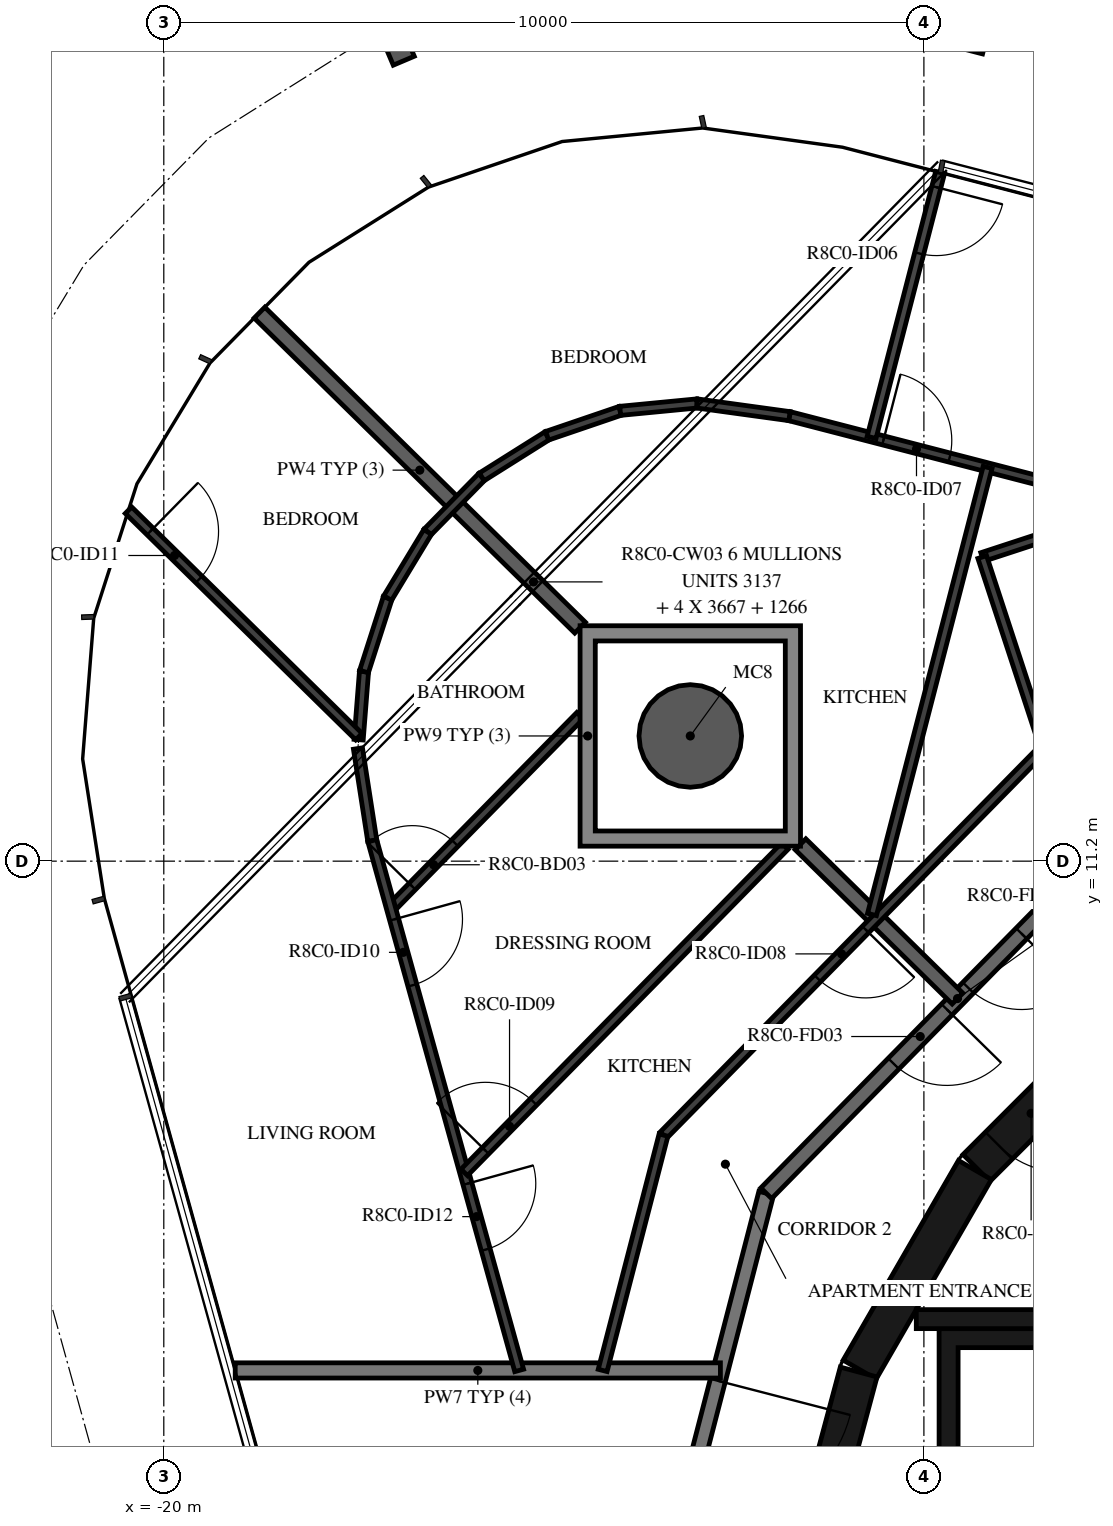
"""IFC4 building model, lengths in metres.
Left out: names, types, materials, properties, quantities, classifications, styles, units other than length and angle.
Written with IfcOpenShell. Run it as: python <this file> out.ifc"""

import sys

from ifc_helpers import new_model, si_unit, direction, frame, frame_2d, origin, origin_2d, place, context, subcontext, project, spatial, polyline, rectangle, hollow_circle, i_section, outline, extrude, element, fill, save


model = new_model("IFC4")
c1 = context("Model", 3, precision=1e-05, world=origin(), true_north=direction((0.0, 1.0)))
c2 = subcontext(c1, "Body", "Model", "MODEL_VIEW")
j1 = project(units=[si_unit("LENGTHUNIT", "METRE"), si_unit("PLANEANGLEUNIT", "RADIAN")], contexts=[c1])
p1 = place(None, origin())
s1 = spatial("IfcSite", under=j1, at=p1, CompositionType="ELEMENT")
p2 = place(p1, origin())
s2 = spatial("IfcBuilding", under=s1, at=p2, CompositionType="ELEMENT")
p3 = place(p2, frame((0.0, 0.0, 319.2)))
s3 = spatial("IfcBuildingStorey", under=s2, at=p3, CompositionType="ELEMENT", Elevation=319.2)
p4 = place(p3, frame((-13.073, 12.847, -0.38), z_axis=(0.0, 0.0, 1.0), x_axis=(1.0, 0.0, 0.0)))
e1 = element("IfcColumn", 1, at=p4, inside=s3, PredefinedType="COLUMN", context=c2, shape_type="SweptSolid", body=[
    extrude(hollow_circle(Radius=0.675, WallThickness=0.03, at=origin_2d()), origin(), (0.0, 0.0, 1.0), 3.5),
])
for number, where, z_axis, x_axis in (
    (2, (-9.261, 22.293, -0.38), (0.0, 0.0, 1.0), (0.968, -0.25, 0.0)),
    (3, (-17.019, 22.145, -0.38), (0.0, 0.0, 1.0), (0.921, 0.391, 0.0)),
):
    element("IfcColumn", number, at=place(p3, frame(where, z_axis=z_axis, x_axis=x_axis)), inside=s3, PredefinedType="COLUMN", context=c2, shape_type="SweptSolid", body=[
        extrude(i_section(OverallWidth=0.3, OverallDepth=0.9, WebThickness=0.019, FlangeThickness=0.035, FilletRadius=0.03, at=origin_2d()), origin(), (0.0, 0.0, 1.0), 3.5),
    ])
p5 = place(p3, frame((-7.164, 9.308, 0.0), z_axis=(0.0, 0.0, 1.0), x_axis=(-0.707106781187, -0.707106781187, 0.0)))
e4 = element("IfcWall", 4, at=p5, inside=s3, PredefinedType="SHEAR", context=c2, shape_type="SweptSolid", body=[
    extrude(rectangle(XDim=3.032, YDim=0.5, at=frame_2d((1.516, 0.0))), origin(), (0.0, 0.0, 1.0), 3.12),
])
p6 = place(p5, frame((1.416, 0.0, 0.0)))
e5 = element("IfcOpeningElement", 5, at=p6, cuts=e4, PredefinedType="OPENING", context=c2, shape_type="SweptSolid", body=[
    extrude(rectangle(XDim=1.2, YDim=2.1, at=frame_2d((0.6, 1.05))), frame((0.0, 0.26, 0.0), z_axis=(0.0, -1.0, 0.0), x_axis=(1.0, 0.0, 0.0)), (0.0, 0.0, 1.0), 0.52),
])
for number, where, z_axis, x_axis in (
    (6, (-9.329, 7.137, 0.0), (0.0, 0.0, 1.0), (-0.5, -0.866, 0.0)),
    (7, (-10.858, 4.479, 0.0), (0.0, 0.0, 1.0), (-0.259, -0.966, 0.0)),
):
    element("IfcWall", number, at=place(p3, frame(where, z_axis=z_axis, x_axis=x_axis)), inside=s3, PredefinedType="SHEAR", context=c2, shape_type="SweptSolid", body=[
        extrude(rectangle(XDim=3.033, YDim=0.5, at=frame_2d((1.516, 0.0))), origin(), (0.0, 0.0, 1.0), 3.12),
    ])
p7 = place(p3, frame((-7.0, 5.175, 0.0), z_axis=(0.0, 0.0, 1.0), x_axis=(-1.0, 0.0, 0.0)))
e8 = element("IfcWall", 8, at=p7, inside=s3, PredefinedType="SHEAR", context=c2, shape_type="SweptSolid", body=[
    extrude(rectangle(XDim=3.1, YDim=0.25, at=frame_2d((1.55, 0.0))), origin(), (0.0, 0.0, 1.0), 3.12),
])
p8 = place(p3, origin())
e9 = element("IfcWall", 9, at=p8, inside=s3, PredefinedType="SHEAR", context=c2, shape_type="SweptSolid", body=[
    extrude(outline(polyline([(-9.8, 1.9), (-9.55, 1.9), (-9.55, 4.8), (-5.5, 4.8), (-5.5, 1.9), (-5.25, 1.9), (-5.25, 4.8), (3.1, 4.8), (3.1, 1.9), (3.35, 1.9), (3.35, 4.8), (5.25, 4.8), (5.25, 1.9), (5.5, 1.9), (5.5, 4.8), (7.4, 4.8), (7.4, 1.9), (7.65, 1.9), (7.65, 4.8), (9.55, 4.8), (9.55, 1.9), (9.8, 1.9), (9.8, 4.8), (9.8, 5.05), (-9.8, 5.05), (-9.8, 4.8), (-9.8, 1.9)])), origin(), (0.0, 0.0, 1.0), 3.12),
])
p9 = place(p3, frame((-12.074, 6.831, 0.0), z_axis=(0.0, 0.0, 1.0), x_axis=(-0.250391063186, -0.968144780225, 0.0)))
e10 = element("IfcWall", 10, at=p9, inside=s3, PredefinedType="STANDARD", context=c2, shape_type="SweptSolid", body=[
    extrude(rectangle(XDim=7.181, YDim=0.2, at=frame_2d((3.591, 0.0))), origin(), (0.0, 0.0, 1.0), 3.12),
])
p10 = place(p9, frame((2.548, 0.0, 0.0)))
e11 = element("IfcOpeningElement", 11, at=p10, cuts=e10, PredefinedType="OPENING", context=c2, shape_type="SweptSolid", body=[
    extrude(rectangle(XDim=1.8, YDim=2.1, at=frame_2d((0.9, 1.05))), frame((0.0, 0.11, 0.0), z_axis=(0.0, -1.0, 0.0), x_axis=(1.0, 0.0, 0.0)), (0.0, 0.0, 1.0), 0.22),
])
p11 = place(p3, frame((-7.041, 11.953, 0.0), z_axis=(0.0, 0.0, 1.0), x_axis=(-0.70090916255, -0.713250549143, 0.0)))
e12 = element("IfcWall", 12, at=p11, inside=s3, PredefinedType="STANDARD", context=c2, shape_type="SweptSolid", body=[
    extrude(rectangle(XDim=7.181, YDim=0.2, at=frame_2d((3.59, 0.0))), origin(), (0.0, 0.0, 1.0), 3.12),
])
p12 = place(p11, frame((2.39, 0.0, 0.0)))
e13 = element("IfcOpeningElement", 13, at=p12, cuts=e12, PredefinedType="OPENING", context=c2, shape_type="SweptSolid", body=[
    extrude(rectangle(XDim=1.0, YDim=2.1, at=frame_2d((0.5, 1.05))), frame((0.0, 0.11, 0.0), z_axis=(0.0, -1.0, 0.0), x_axis=(1.0, 0.0, 0.0)), (0.0, 0.0, 1.0), 0.22),
])
p13 = place(p11, frame((3.791, 0.0, 0.0)))
e14 = element("IfcOpeningElement", 14, at=p13, cuts=e12, PredefinedType="OPENING", context=c2, shape_type="SweptSolid", body=[
    extrude(rectangle(XDim=1.0, YDim=2.1, at=frame_2d((0.5, 1.05))), frame((0.0, 0.11, 0.0), z_axis=(0.0, -1.0, 0.0), x_axis=(1.0, 0.0, 0.0)), (0.0, 0.0, 1.0), 0.22),
])
p14 = place(p3, frame((-12.677, 4.5, 0.0), z_axis=(0.0, 0.0, 1.0), x_axis=(-1.0, 0.0, 0.0)))
e15 = element("IfcWall", 15, at=p14, inside=s3, PredefinedType="STANDARD", context=c2, shape_type="SweptSolid", body=[
    extrude(rectangle(XDim=6.383, YDim=0.2, at=frame_2d((3.192, 0.0))), origin(), (0.0, 0.0, 1.0), 3.12),
])
p15 = place(p3, frame((-11.623, 11.422, 0.0), z_axis=(0.0, 0.0, 1.0), x_axis=(0.713233657229, -0.700926351478, 0.0)))
e16 = element("IfcWall", 16, at=p15, inside=s3, PredefinedType="STANDARD", context=c2, shape_type="SweptSolid", body=[
    extrude(rectangle(XDim=2.896, YDim=0.2, at=frame_2d((1.448, 0.0))), origin(), (0.0, 0.0, 1.0), 3.12),
])
p16 = place(p3, frame((-18.741, 18.417, 0.0), z_axis=(0.0, 0.0, 1.0), x_axis=(0.713252414586, -0.700907264256, 0.0)))
e17 = element("IfcWall", 17, at=p16, inside=s3, PredefinedType="STANDARD", context=c2, shape_type="SweptSolid", body=[
    extrude(rectangle(XDim=5.913, YDim=0.2, at=frame_2d((2.957, 0.0))), origin(), (0.0, 0.0, 1.0), 3.12),
])
p17 = place(p3, frame((-7.617, 15.73, 0.0), z_axis=(0.0, 0.0, 1.0), x_axis=(-0.950307562936, -0.311312601457, 0.0)))
e18 = element("IfcWall", 18, at=p17, inside=s3, PredefinedType="PARTITIONING", context=c2, shape_type="SweptSolid", body=[
    extrude(rectangle(XDim=1.7, YDim=0.12, at=frame_2d((0.85, 0.0))), origin(), (0.0, 0.0, 1.0), 3.12),
])
p18 = place(p3, frame((-9.233, 15.201, 0.0), z_axis=(0.0, 0.0, 1.0), x_axis=(0.311302357688, -0.950310918646, 0.0)))
e19 = element("IfcWall", 19, at=p18, inside=s3, PredefinedType="PARTITIONING", context=c2, shape_type="SweptSolid", body=[
    extrude(rectangle(XDim=2.634, YDim=0.12, at=frame_2d((1.317, 0.0))), origin(), (0.0, 0.0, 1.0), 3.12),
])
p19 = place(p3, frame((-8.413, 12.698, 0.0), z_axis=(0.0, 0.0, 1.0), x_axis=(-0.700901588882, -0.713257991686, 0.0)))
e20 = element("IfcWall", 20, at=p19, inside=s3, PredefinedType="PARTITIONING", context=c2, shape_type="SweptSolid", body=[
    extrude(rectangle(XDim=7.153, YDim=0.12, at=frame_2d((3.576, 0.0))), origin(), (0.0, 0.0, 1.0), 3.12),
])
p20 = place(p19, frame((3.36, 0.0, 0.0)))
e21 = element("IfcOpeningElement", 21, at=p20, cuts=e20, PredefinedType="OPENING", context=c2, shape_type="SweptSolid", body=[
    extrude(rectangle(XDim=0.9, YDim=2.1, at=frame_2d((0.45, 1.05))), frame((0.0, 0.07, 0.0), z_axis=(0.0, -1.0, 0.0), x_axis=(1.0, 0.0, 0.0)), (0.0, 0.0, 1.0), 0.14),
])
p21 = place(p3, frame((-11.769, 17.054, 0.0), z_axis=(0.0, 0.0, 1.0), x_axis=(0.968146475492, -0.250384508293, 0.0)))
e22 = element("IfcWall", 22, at=p21, inside=s3, PredefinedType="PARTITIONING", context=c2, shape_type="SweptSolid", body=[
    extrude(rectangle(XDim=9.359, YDim=0.12, at=frame_2d((4.679, 0.0))), origin(), (0.0, 0.0, 1.0), 3.12),
])
p22 = place(p21, frame((1.276, 0.0, 0.0)))
e23 = element("IfcOpeningElement", 23, at=p22, cuts=e22, PredefinedType="OPENING", context=c2, shape_type="SweptSolid", body=[
    extrude(rectangle(XDim=0.9, YDim=2.1, at=frame_2d((0.45, 1.05))), frame((0.0, 0.07, 0.0), z_axis=(0.0, -1.0, 0.0), x_axis=(1.0, 0.0, 0.0)), (0.0, 0.0, 1.0), 0.14),
])
p23 = place(p3, frame((-9.787, 20.26, 0.0), z_axis=(0.0, 0.0, 1.0), x_axis=(-0.250378438176, -0.968148045341, 0.0)))
e24 = element("IfcWall", 24, at=p23, inside=s3, PredefinedType="PARTITIONING", context=c2, shape_type="SweptSolid", body=[
    extrude(rectangle(XDim=3.6, YDim=0.12, at=frame_2d((1.8, 0.0))), origin(), (0.0, 0.0, 1.0), 2.73),
])
p24 = place(p23, frame((0.2, 0.0, 0.0)))
e25 = element("IfcOpeningElement", 25, at=p24, cuts=e24, PredefinedType="OPENING", context=c2, shape_type="SweptSolid", body=[
    extrude(rectangle(XDim=0.9, YDim=2.1, at=frame_2d((0.45, 1.05))), frame((0.0, 0.07, 0.0), z_axis=(0.0, -1.0, 0.0), x_axis=(1.0, 0.0, 0.0)), (0.0, 0.0, 1.0), 0.14),
])
p25 = place(p3, frame((-9.162, 16.38, 0.0), z_axis=(0.0, 0.0, 1.0), x_axis=(-0.250384770134, -0.968146407774, 0.0)))
e26 = element("IfcWall", 26, at=p25, inside=s3, PredefinedType="PARTITIONING", context=c2, shape_type="SweptSolid", body=[
    extrude(rectangle(XDim=6.076, YDim=0.12, at=frame_2d((3.038, 0.0))), origin(), (0.0, 0.0, 1.0), 3.12),
])
for number, where, z_axis, x_axis in (
    (27, (-16.529, 15.531, 0.0), (0.0, 0.0, 1.0), (0.701, 0.713, 0.0)),
    (28, (-15.817, 16.256, 0.0), (0.0, 0.0, 1.0), (0.847, 0.532, 0.0)),
    (29, (-14.957, 16.796, 0.0), (0.0, 0.0, 1.0), (0.946, 0.323, 0.0)),
    (30, (-13.996, 17.124, 0.0), (0.0, 0.0, 1.0), (0.995, 0.096, 0.0)),
):
    element("IfcWall", number, at=place(p3, frame(where, z_axis=z_axis, x_axis=x_axis)), inside=s3, PredefinedType="PARTITIONING", context=c2, shape_type="SweptSolid", body=[
        extrude(rectangle(XDim=1.016, YDim=0.12, at=frame_2d((0.508, 0.0))), origin(), (0.0, 0.0, 1.0), 3.12),
    ])
p26 = place(p3, frame((-12.984, 17.222, 0.0), z_axis=(0.0, 0.0, 1.0), x_axis=(0.990668432332, -0.136294010072, 0.0)))
e31 = element("IfcWall", 31, at=p26, inside=s3, PredefinedType="PARTITIONING", context=c2, shape_type="SweptSolid", body=[
    extrude(rectangle(XDim=1.227, YDim=0.12, at=frame_2d((0.614, 0.0))), origin(), (0.0, 0.0, 1.0), 3.12),
])
p27 = place(p3, frame((-13.426, 7.596, 0.0), z_axis=(0.0, 0.0, 1.0), x_axis=(-0.250342106136, -0.968157440655, 0.0)))
e32 = element("IfcWall", 32, at=p27, inside=s3, PredefinedType="PARTITIONING", context=c2, shape_type="SweptSolid", body=[
    extrude(rectangle(XDim=3.198, YDim=0.12, at=frame_2d((1.599, 0.0))), origin(), (0.0, 0.0, 1.0), 3.12),
])
p28 = place(p3, frame((-17.437, 12.798, 0.0), z_axis=(0.0, 0.0, 1.0), x_axis=(0.078482315782, 0.996915506003, 0.0)))
e33 = element("IfcWall", 33, at=p28, inside=s3, PredefinedType="PARTITIONING", context=c2, shape_type="SweptSolid", body=[
    extrude(rectangle(XDim=0.899, YDim=0.12, at=frame_2d((0.449, 0.0))), origin(), (0.0, 0.0, 1.0), 3.12),
])
for number, where, z_axis, x_axis in (
    (34, (-17.366, 13.695, 0.0), (0.0, 0.0, 1.0), (0.306, 0.952, 0.0)),
    (35, (-17.055, 14.662, 0.0), (0.0, 0.0, 1.0), (0.517, 0.856, 0.0)),
):
    element("IfcWall", number, at=place(p3, frame(where, z_axis=z_axis, x_axis=x_axis)), inside=s3, PredefinedType="PARTITIONING", context=c2, shape_type="SweptSolid", body=[
        extrude(rectangle(XDim=1.016, YDim=0.12, at=frame_2d((0.508, 0.0))), origin(), (0.0, 0.0, 1.0), 3.12),
    ])
p29 = place(p3, frame((-20.465, 15.817, 0.0), z_axis=(0.0, 0.0, 1.0), x_axis=(0.713254811643, -0.700904824971, 0.0)))
e36 = element("IfcWall", 36, at=p29, inside=s3, PredefinedType="PARTITIONING", context=c2, shape_type="SweptSolid", body=[
    extrude(rectangle(XDim=4.25, YDim=0.12, at=frame_2d((2.125, 0.0))), origin(), (0.0, 0.0, 1.0), 3.12),
])
p30 = place(p29, frame((0.4, 0.0, 0.0)))
e37 = element("IfcOpeningElement", 37, at=p30, cuts=e36, PredefinedType="OPENING", context=c2, shape_type="SweptSolid", body=[
    extrude(rectangle(XDim=0.9, YDim=2.1, at=frame_2d((0.45, 1.05))), frame((0.0, 0.07, 0.0), z_axis=(0.0, -1.0, 0.0), x_axis=(1.0, 0.0, 0.0)), (0.0, 0.0, 1.0), 0.14),
])
p31 = place(p3, frame((-17.011, 10.582, 0.0), z_axis=(0.0, 0.0, 1.0), x_axis=(0.700924288011, 0.713235685083, 0.0)))
e38 = element("IfcWall", 38, at=p31, inside=s3, PredefinedType="PARTITIONING", context=c2, shape_type="SweptSolid", body=[
    extrude(rectangle(XDim=3.55, YDim=0.12, at=frame_2d((1.775, 0.0))), origin(), (0.0, 0.0, 1.0), 3.12),
])
p32 = place(p31, frame((0.4, 0.0, 0.0)))
e39 = element("IfcOpeningElement", 39, at=p32, cuts=e38, PredefinedType="OPENING", context=c2, shape_type="SweptSolid", body=[
    extrude(rectangle(XDim=0.8, YDim=2.1, at=frame_2d((0.4, 1.05))), frame((0.0, 0.07, 0.0), z_axis=(0.0, -1.0, 0.0), x_axis=(1.0, 0.0, 0.0)), (0.0, 0.0, 1.0), 0.14),
])
p33 = place(p3, frame((-17.446, 12.682, 0.0), z_axis=(0.0, 0.0, 1.0), x_axis=(0.153612025092, -0.988131239131, 0.0)))
e40 = element("IfcWall", 40, at=p33, inside=s3, PredefinedType="PARTITIONING", context=c2, shape_type="SweptSolid", body=[
    extrude(rectangle(XDim=1.227, YDim=0.12, at=frame_2d((0.614, 0.0))), origin(), (0.0, 0.0, 1.0), 3.12),
])
p34 = place(p3, frame((-17.257, 11.469, 0.0), z_axis=(0.0, 0.0, 1.0), x_axis=(0.267222501114, -0.963634855585, 0.0)))
e41 = element("IfcWall", 41, at=p34, inside=s3, PredefinedType="PARTITIONING", context=c2, shape_type="SweptSolid", body=[
    extrude(rectangle(XDim=7.232, YDim=0.12, at=frame_2d((3.616, 0.0))), origin(), (0.0, 0.0, 1.0), 3.12),
])
p35 = place(p34, frame((1.074, 0.0, 0.0)))
e42 = element("IfcOpeningElement", 42, at=p35, cuts=e41, PredefinedType="OPENING", context=c2, shape_type="SweptSolid", body=[
    extrude(rectangle(XDim=0.9, YDim=2.1, at=frame_2d((0.45, 1.05))), frame((0.0, 0.07, 0.0), z_axis=(0.0, -1.0, 0.0), x_axis=(1.0, 0.0, 0.0)), (0.0, 0.0, 1.0), 0.14),
])
p36 = place(p34, frame((4.682, 0.0, 0.0)))
e43 = element("IfcOpeningElement", 43, at=p36, cuts=e41, PredefinedType="OPENING", context=c2, shape_type="SweptSolid", body=[
    extrude(rectangle(XDim=0.9, YDim=2.1, at=frame_2d((0.45, 1.05))), frame((0.0, 0.07, 0.0), z_axis=(0.0, -1.0, 0.0), x_axis=(1.0, 0.0, 0.0)), (0.0, 0.0, 1.0), 0.14),
])
p37 = place(p3, frame((-16.047, 7.105, 0.0), z_axis=(0.0, 0.0, 1.0), x_axis=(0.700892382646, 0.713267038316, 0.0)))
e44 = element("IfcWall", 44, at=p37, inside=s3, PredefinedType="PARTITIONING", context=c2, shape_type="SweptSolid", body=[
    extrude(rectangle(XDim=6.017, YDim=0.12, at=frame_2d((3.009, 0.0))), origin(), (0.0, 0.0, 1.0), 3.12),
])
p38 = place(p37, frame((0.4, 0.0, 0.0)))
e45 = element("IfcOpeningElement", 45, at=p38, cuts=e44, PredefinedType="OPENING", context=c2, shape_type="SweptSolid", body=[
    extrude(rectangle(XDim=0.9, YDim=2.1, at=frame_2d((0.45, 1.05))), frame((0.0, 0.07, 0.0), z_axis=(0.0, -1.0, 0.0), x_axis=(1.0, 0.0, 0.0)), (0.0, 0.0, 1.0), 0.14),
])
p39 = place(p3, origin())
e46 = element("IfcWall", 46, at=p39, inside=s3, PredefinedType="STANDARD", context=c2, shape_type="SweptSolid", body=[
    extrude(outline(polyline([(-11.623, 14.297), (-11.623, 11.397), (-14.523, 11.397), (-14.523, 14.297), (-11.623, 14.297)]), holes=[polyline([(-14.323, 11.597), (-11.823, 11.597), (-11.823, 14.097), (-14.323, 14.097), (-14.323, 11.597)])]), origin(), (0.0, 0.0, 1.0), 3.12),
])
p40 = place(p6, origin())
e47 = element("IfcDoor", 47, at=p40, inside=s3, OperationType="SINGLE_SWING_RIGHT", PredefinedType="DOOR", context=c2, shape_type="SweptSolid", body=[
    extrude(rectangle(XDim=1.2, YDim=2.1, at=frame_2d((0.6, 1.05))), frame((0.0, 0.025, 0.0), z_axis=(0.0, -1.0, 0.0), x_axis=(1.0, 0.0, 0.0)), (0.0, 0.0, 1.0), 0.05),
])
fill(e5, e47)
p41 = place(p12, origin())
e48 = element("IfcDoor", 48, at=p41, inside=s3, OperationType="SINGLE_SWING_RIGHT", PredefinedType="DOOR", context=c2, shape_type="SweptSolid", body=[
    extrude(rectangle(XDim=1.0, YDim=2.1, at=frame_2d((0.5, 1.05))), frame((0.0, 0.025, 0.0), z_axis=(0.0, -1.0, 0.0), x_axis=(1.0, 0.0, 0.0)), (0.0, 0.0, 1.0), 0.05),
])
fill(e13, e48)
p42 = place(p24, origin())
e49 = element("IfcDoor", 49, at=p42, inside=s3, OperationType="SINGLE_SWING_RIGHT", PredefinedType="DOOR", context=c2, shape_type="SweptSolid", body=[
    extrude(rectangle(XDim=0.9, YDim=2.1, at=frame_2d((0.45, 1.05))), frame((0.0, 0.025, 0.0), z_axis=(0.0, -1.0, 0.0), x_axis=(1.0, 0.0, 0.0)), (0.0, 0.0, 1.0), 0.05),
])
fill(e25, e49)
p43 = place(p22, origin())
e50 = element("IfcDoor", 50, at=p43, inside=s3, OperationType="SINGLE_SWING_LEFT", PredefinedType="DOOR", context=c2, shape_type="SweptSolid", body=[
    extrude(rectangle(XDim=0.9, YDim=2.1, at=frame_2d((0.45, 1.05))), frame((0.0, 0.025, 0.0), z_axis=(0.0, -1.0, 0.0), x_axis=(1.0, 0.0, 0.0)), (0.0, 0.0, 1.0), 0.05),
])
fill(e23, e50)
p44 = place(p13, origin())
e51 = element("IfcDoor", 51, at=p44, inside=s3, OperationType="SINGLE_SWING_LEFT", PredefinedType="DOOR", context=c2, shape_type="SweptSolid", body=[
    extrude(rectangle(XDim=1.0, YDim=2.1, at=frame_2d((0.5, 1.05))), frame((0.0, 0.025, 0.0), z_axis=(0.0, -1.0, 0.0), x_axis=(1.0, 0.0, 0.0)), (0.0, 0.0, 1.0), 0.05),
])
fill(e14, e51)
p45 = place(p20, origin())
e52 = element("IfcDoor", 52, at=p45, inside=s3, OperationType="SINGLE_SWING_LEFT", PredefinedType="DOOR", context=c2, shape_type="SweptSolid", body=[
    extrude(rectangle(XDim=0.9, YDim=2.1, at=frame_2d((0.45, 1.05))), frame((0.0, 0.025, 0.0), z_axis=(0.0, -1.0, 0.0), x_axis=(1.0, 0.0, 0.0)), (0.0, 0.0, 1.0), 0.05),
])
fill(e21, e52)
p46 = place(p38, origin())
e53 = element("IfcDoor", 53, at=p46, inside=s3, OperationType="SINGLE_SWING_LEFT", PredefinedType="DOOR", context=c2, shape_type="SweptSolid", body=[
    extrude(rectangle(XDim=0.9, YDim=2.1, at=frame_2d((0.45, 1.05))), frame((0.0, 0.025, 0.0), z_axis=(0.0, -1.0, 0.0), x_axis=(1.0, 0.0, 0.0)), (0.0, 0.0, 1.0), 0.05),
])
fill(e45, e53)
p47 = place(p32, origin())
e54 = element("IfcDoor", 54, at=p47, inside=s3, OperationType="SINGLE_SWING_LEFT", PredefinedType="DOOR", context=c2, shape_type="SweptSolid", body=[
    extrude(rectangle(XDim=0.8, YDim=2.1, at=frame_2d((0.4, 1.05))), frame((0.0, 0.025, 0.0), z_axis=(0.0, -1.0, 0.0), x_axis=(1.0, 0.0, 0.0)), (0.0, 0.0, 1.0), 0.05),
])
fill(e39, e54)
p48 = place(p35, origin())
e55 = element("IfcDoor", 55, at=p48, inside=s3, OperationType="SINGLE_SWING_LEFT", PredefinedType="DOOR", context=c2, shape_type="SweptSolid", body=[
    extrude(rectangle(XDim=0.9, YDim=2.1, at=frame_2d((0.45, 1.05))), frame((0.0, 0.025, 0.0), z_axis=(0.0, -1.0, 0.0), x_axis=(1.0, 0.0, 0.0)), (0.0, 0.0, 1.0), 0.05),
])
fill(e42, e55)
p49 = place(p30, origin())
e56 = element("IfcDoor", 56, at=p49, inside=s3, OperationType="SINGLE_SWING_LEFT", PredefinedType="DOOR", context=c2, shape_type="SweptSolid", body=[
    extrude(rectangle(XDim=0.9, YDim=2.1, at=frame_2d((0.45, 1.05))), frame((0.0, 0.025, 0.0), z_axis=(0.0, -1.0, 0.0), x_axis=(1.0, 0.0, 0.0)), (0.0, 0.0, 1.0), 0.05),
])
fill(e37, e56)
p50 = place(p36, origin())
e57 = element("IfcDoor", 57, at=p50, inside=s3, OperationType="SINGLE_SWING_RIGHT", PredefinedType="DOOR", context=c2, shape_type="SweptSolid", body=[
    extrude(rectangle(XDim=0.9, YDim=2.1, at=frame_2d((0.45, 1.05))), frame((0.0, 0.025, 0.0), z_axis=(0.0, -1.0, 0.0), x_axis=(1.0, 0.0, 0.0)), (0.0, 0.0, 1.0), 0.05),
])
fill(e43, e57)
p51 = place(p10, origin())
e58 = element("IfcDoor", 58, at=p51, inside=s3, OperationType="DOUBLE_DOOR_SINGLE_SWING", PredefinedType="DOOR", context=c2, shape_type="SweptSolid", body=[
    extrude(rectangle(XDim=1.8, YDim=2.1, at=frame_2d((0.9, 1.05))), frame((0.0, 0.025, 0.0), z_axis=(0.0, -1.0, 0.0), x_axis=(1.0, 0.0, 0.0)), (0.0, 0.0, 1.0), 0.05),
])
fill(e11, e58)
save(model, sys.argv[1])
